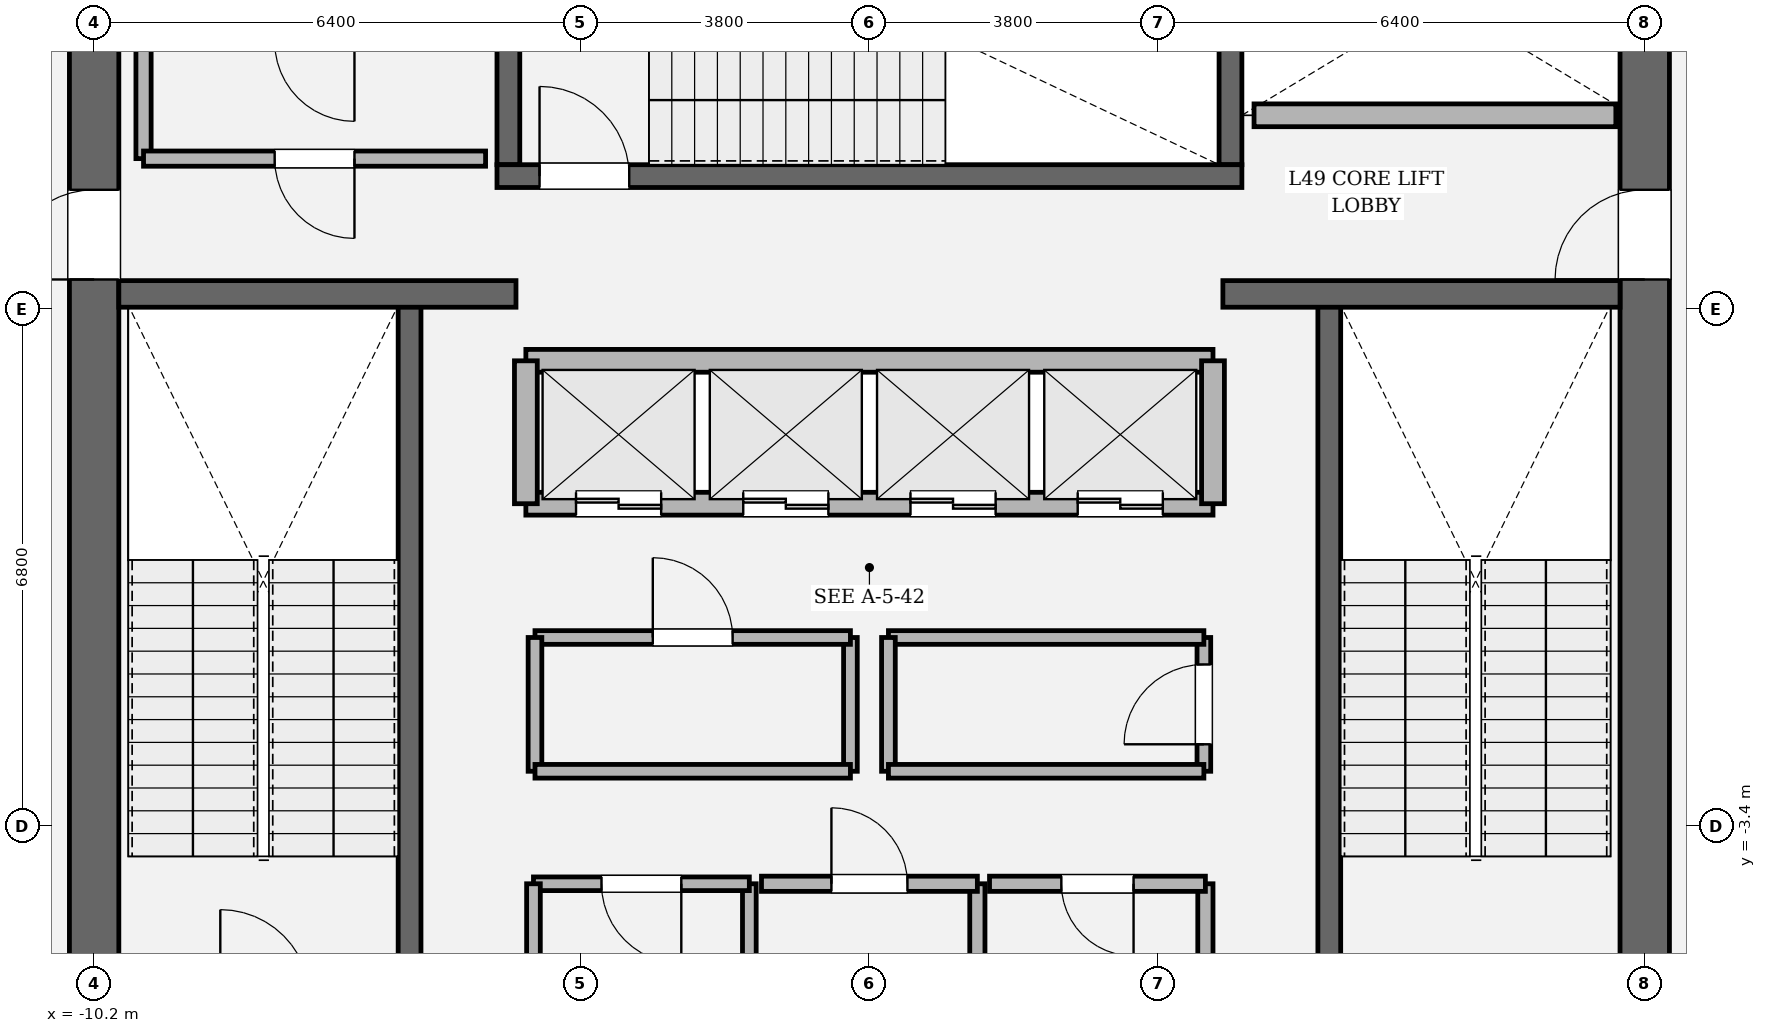
"""IFC4 building model, lengths in metres.
Left out: names, types, materials, properties, quantities, classifications, styles, units other than length and angle.
Written with IfcOpenShell. Run it as: python <this file> out.ifc"""

import sys

from ifc_helpers import new_model, si_unit, direction, frame, frame_2d, origin, place, context, subcontext, project, spatial, rectangle, extrude, element, fill, save


model = new_model("IFC4")
c1 = context("Model", 3, precision=1e-05, world=origin(), true_north=direction((0.0, 1.0)))
c2 = subcontext(c1, "Body", "Model", "MODEL_VIEW")
j1 = project(units=[si_unit("LENGTHUNIT", "METRE"), si_unit("PLANEANGLEUNIT", "RADIAN")], contexts=[c1])
p1 = place(None, origin())
s1 = spatial("IfcSite", under=j1, at=p1, CompositionType="ELEMENT")
p2 = place(p1, origin())
s2 = spatial("IfcBuilding", under=s1, at=p2, CompositionType="ELEMENT")
p3 = place(p2, frame((0.0, 0.0, 208.65)))
s3 = spatial("IfcBuildingStorey", under=s2, at=p3, CompositionType="ELEMENT", Elevation=208.65)
p4 = place(p3, frame((-10.2, -8.875, 0.0), z_axis=(0.0, 0.0, 1.0), x_axis=(0.0, 1.0, 0.0)))
e1 = element("IfcWall", 1, at=p4, inside=s3, PredefinedType="SHEAR", context=c2, shape_type="SweptSolid", body=[
    extrude(rectangle(XDim=17.75, YDim=0.65, at=frame_2d((8.875, 0.0))), origin(), (0.0, 0.0, 1.0), 4.05),
])
p5 = place(p4, frame((12.665, 0.0, 0.0)))
e2 = element("IfcOpeningElement", 2, at=p5, cuts=e1, PredefinedType="OPENING", context=c2, shape_type="SweptSolid", body=[
    extrude(rectangle(XDim=1.18, YDim=2.2, at=frame_2d((0.59, 1.1))), frame((0.0, 0.335, 0.0), z_axis=(0.0, -1.0, 0.0), x_axis=(1.0, 0.0, 0.0)), (0.0, 0.0, 1.0), 0.67),
])
p6 = place(p3, frame((10.2, 8.875, 0.0), z_axis=(0.0, 0.0, 1.0), x_axis=(0.0, -1.0, 0.0)))
e3 = element("IfcWall", 3, at=p6, inside=s3, PredefinedType="SHEAR", context=c2, shape_type="SweptSolid", body=[
    extrude(rectangle(XDim=17.75, YDim=0.65, at=frame_2d((8.875, 0.0))), origin(), (0.0, 0.0, 1.0), 4.05),
])
p7 = place(p6, frame((3.905, 0.0, 0.0)))
e4 = element("IfcOpeningElement", 4, at=p7, cuts=e3, PredefinedType="OPENING", context=c2, shape_type="SweptSolid", body=[
    extrude(rectangle(XDim=1.18, YDim=2.2, at=frame_2d((0.59, 1.1))), frame((0.0, 0.335, 0.0), z_axis=(0.0, -1.0, 0.0), x_axis=(1.0, 0.0, 0.0)), (0.0, 0.0, 1.0), 0.67),
])
for number, where, z_axis, x_axis in (
    (5, (-6.05, -5.5, 0.0), (0.0, 0.0, 1.0), (0.0, 1.0, 0.0)),
    (6, (6.05, 3.45, 0.0), (0.0, 0.0, 1.0), (0.0, -1.0, 0.0)),
):
    element("IfcWall", number, at=place(p3, frame(where, z_axis=z_axis, x_axis=x_axis)), inside=s3, PredefinedType="SOLIDWALL", context=c2, shape_type="SweptSolid", body=[
        extrude(rectangle(XDim=8.95, YDim=0.3, at=frame_2d((4.475, 0.0))), origin(), (0.0, 0.0, 1.0), 4.05),
    ])
for number, where, z_axis, x_axis in (
    (7, (-4.75, 5.3, 0.0), (0.0, 0.0, 1.0), (0.0, 1.0, 0.0)),
    (8, (4.75, 8.875, 0.0), (0.0, 0.0, 1.0), (0.0, -1.0, 0.0)),
):
    element("IfcWall", number, at=place(p3, frame(where, z_axis=z_axis, x_axis=x_axis)), inside=s3, PredefinedType="SOLIDWALL", context=c2, shape_type="SweptSolid", body=[
        extrude(rectangle(XDim=3.575, YDim=0.3, at=frame_2d((1.788, 0.0))), origin(), (0.0, 0.0, 1.0), 4.05),
    ])
p8 = place(p3, frame((-4.9, 5.15, 0.0), z_axis=(0.0, 0.0, 1.0), x_axis=(1.0, 0.0, 0.0)))
e9 = element("IfcWall", 9, at=p8, inside=s3, PredefinedType="SOLIDWALL", context=c2, shape_type="SweptSolid", body=[
    extrude(rectangle(XDim=9.8, YDim=0.3, at=frame_2d((4.9, 0.0))), origin(), (0.0, 0.0, 1.0), 4.05),
])
p9 = place(p8, frame((0.56, 0.0, 0.0)))
e10 = element("IfcOpeningElement", 10, at=p9, cuts=e9, PredefinedType="OPENING", context=c2, shape_type="SweptSolid", body=[
    extrude(rectangle(XDim=1.18, YDim=2.2, at=frame_2d((0.59, 1.1))), frame((0.0, 0.16, 0.0), z_axis=(0.0, -1.0, 0.0), x_axis=(1.0, 0.0, 0.0)), (0.0, 0.0, 1.0), 0.32),
])
for number, where, z_axis, x_axis in (
    (11, (-9.875, 3.6, 0.0), (0.0, 0.0, 1.0), (1.0, 0.0, 0.0)),
    (12, (4.65, 3.6, 0.0), (0.0, 0.0, 1.0), (1.0, 0.0, 0.0)),
):
    element("IfcWall", number, at=place(p3, frame(where, z_axis=z_axis, x_axis=x_axis)), inside=s3, PredefinedType="SOLIDWALL", context=c2, shape_type="SweptSolid", body=[
        extrude(rectangle(XDim=5.225, YDim=0.35, at=frame_2d((2.613, 0.0))), origin(), (0.0, 0.0, 1.0), 4.05),
    ])
p10 = place(p3, frame((-4.52, 0.84, 0.0), z_axis=(0.0, 0.0, 1.0), x_axis=(1.0, 0.0, 0.0)))
e13 = element("IfcWall", 13, at=p10, inside=s3, PredefinedType="SOLIDWALL", context=c2, shape_type="SweptSolid", body=[
    extrude(rectangle(XDim=9.04, YDim=0.3, at=frame_2d((4.52, 0.0))), origin(), (0.0, 0.0, 1.0), 3.83),
])
p11 = place(p10, frame((0.66, 0.0, 0.0)))
e14 = element("IfcOpeningElement", 14, at=p11, cuts=e13, PredefinedType="OPENING", context=c2, shape_type="SweptSolid", body=[
    extrude(rectangle(XDim=1.12, YDim=2.25, at=frame_2d((0.56, 1.125))), frame((0.0, 0.16, 0.0), z_axis=(0.0, -1.0, 0.0), x_axis=(1.0, 0.0, 0.0)), (0.0, 0.0, 1.0), 0.32),
])
p12 = place(p10, frame((2.86, 0.0, 0.0)))
e15 = element("IfcOpeningElement", 15, at=p12, cuts=e13, PredefinedType="OPENING", context=c2, shape_type="SweptSolid", body=[
    extrude(rectangle(XDim=1.12, YDim=2.25, at=frame_2d((0.56, 1.125))), frame((0.0, 0.16, 0.0), z_axis=(0.0, -1.0, 0.0), x_axis=(1.0, 0.0, 0.0)), (0.0, 0.0, 1.0), 0.32),
])
p13 = place(p10, frame((5.06, 0.0, 0.0)))
e16 = element("IfcOpeningElement", 16, at=p13, cuts=e13, PredefinedType="OPENING", context=c2, shape_type="SweptSolid", body=[
    extrude(rectangle(XDim=1.12, YDim=2.25, at=frame_2d((0.56, 1.125))), frame((0.0, 0.16, 0.0), z_axis=(0.0, -1.0, 0.0), x_axis=(1.0, 0.0, 0.0)), (0.0, 0.0, 1.0), 0.32),
])
p14 = place(p10, frame((7.26, 0.0, 0.0)))
e17 = element("IfcOpeningElement", 17, at=p14, cuts=e13, PredefinedType="OPENING", context=c2, shape_type="SweptSolid", body=[
    extrude(rectangle(XDim=1.12, YDim=2.25, at=frame_2d((0.56, 1.125))), frame((0.0, 0.16, 0.0), z_axis=(0.0, -1.0, 0.0), x_axis=(1.0, 0.0, 0.0)), (0.0, 0.0, 1.0), 0.32),
])
p15 = place(p3, frame((-4.52, 2.72, 0.0), z_axis=(0.0, 0.0, 1.0), x_axis=(1.0, 0.0, 0.0)))
e18 = element("IfcWall", 18, at=p15, inside=s3, PredefinedType="SOLIDWALL", context=c2, shape_type="SweptSolid", body=[
    extrude(rectangle(XDim=9.04, YDim=0.3, at=frame_2d((4.52, 0.0))), origin(), (0.0, 0.0, 1.0), 3.83),
])
for number, where, z_axis, x_axis in (
    (19, (-4.52, 0.84, 0.0), (0.0, 0.0, 1.0), (0.0, 1.0, 0.0)),
    (20, (4.52, 0.84, 0.0), (0.0, 0.0, 1.0), (0.0, 1.0, 0.0)),
):
    element("IfcWall", number, at=place(p3, frame(where, z_axis=z_axis, x_axis=x_axis)), inside=s3, PredefinedType="SOLIDWALL", context=c2, shape_type="SweptSolid", body=[
        extrude(rectangle(XDim=1.88, YDim=0.3, at=frame_2d((0.94, 0.0))), origin(), (0.0, 0.0, 1.0), 3.83),
    ])
p16 = place(p3, frame((5.06, 5.95, 0.0), z_axis=(0.0, 0.0, 1.0), x_axis=(1.0, 0.0, 0.0)))
e21 = element("IfcWall", 21, at=p16, inside=s3, PredefinedType="SOLIDWALL", context=c2, shape_type="SweptSolid", body=[
    extrude(rectangle(XDim=4.76, YDim=0.3, at=frame_2d((2.38, 0.0))), origin(), (0.0, 0.0, 1.0), 3.83),
])
p17 = place(p3, frame((-1.58, -5.9, 0.0), z_axis=(0.0, 0.0, 1.0), x_axis=(0.0, 1.0, 0.0)))
e22 = element("IfcWall", 22, at=p17, inside=s3, PredefinedType="PARTITIONING", context=c2, shape_type="SweptSolid", body=[
    extrude(rectangle(XDim=1.74, YDim=0.18, at=frame_2d((0.87, 0.0))), origin(), (0.0, 0.0, 1.0), 3.83),
])
p18 = place(p3, frame((-1.58, -4.16, 0.0), z_axis=(0.0, 0.0, 1.0), x_axis=(-1.0, 0.0, 0.0)))
e23 = element("IfcWall", 23, at=p18, inside=s3, PredefinedType="PARTITIONING", context=c2, shape_type="SweptSolid", body=[
    extrude(rectangle(XDim=2.84, YDim=0.18, at=frame_2d((1.42, 0.0))), origin(), (0.0, 0.0, 1.0), 3.83),
])
p19 = place(p18, frame((0.895, 0.0, 0.0)))
e24 = element("IfcOpeningElement", 24, at=p19, cuts=e23, PredefinedType="OPENING", context=c2, shape_type="SweptSolid", body=[
    extrude(rectangle(XDim=1.05, YDim=2.2, at=frame_2d((0.525, 1.1))), frame((0.0, 0.1, 0.0), z_axis=(0.0, -1.0, 0.0), x_axis=(1.0, 0.0, 0.0)), (0.0, 0.0, 1.0), 0.2),
])
p20 = place(p3, frame((-4.42, -4.16, 0.0), z_axis=(0.0, 0.0, 1.0), x_axis=(0.0, -1.0, 0.0)))
e25 = element("IfcWall", 25, at=p20, inside=s3, PredefinedType="PARTITIONING", context=c2, shape_type="SweptSolid", body=[
    extrude(rectangle(XDim=1.74, YDim=0.18, at=frame_2d((0.87, 0.0))), origin(), (0.0, 0.0, 1.0), 3.83),
])
p21 = place(p3, frame((1.42, -5.9, 0.0), z_axis=(0.0, 0.0, 1.0), x_axis=(0.0, 1.0, 0.0)))
e26 = element("IfcWall", 26, at=p21, inside=s3, PredefinedType="SOLIDWALL", context=c2, shape_type="SweptSolid", body=[
    extrude(rectangle(XDim=1.74, YDim=0.2, at=frame_2d((0.87, 0.0))), origin(), (0.0, 0.0, 1.0), 3.83),
])
p22 = place(p3, frame((1.42, -4.16, 0.0), z_axis=(0.0, 0.0, 1.0), x_axis=(-1.0, 0.0, 0.0)))
e27 = element("IfcWall", 27, at=p22, inside=s3, PredefinedType="SOLIDWALL", context=c2, shape_type="SweptSolid", body=[
    extrude(rectangle(XDim=2.84, YDim=0.2, at=frame_2d((1.42, 0.0))), origin(), (0.0, 0.0, 1.0), 3.83),
])
p23 = place(p22, frame((0.92, 0.0, 0.0)))
e28 = element("IfcOpeningElement", 28, at=p23, cuts=e27, PredefinedType="OPENING", context=c2, shape_type="SweptSolid", body=[
    extrude(rectangle(XDim=1.0, YDim=2.15, at=frame_2d((0.5, 1.075))), frame((0.0, 0.11, 0.0), z_axis=(0.0, -1.0, 0.0), x_axis=(1.0, 0.0, 0.0)), (0.0, 0.0, 1.0), 0.22),
])
p24 = place(p3, frame((4.42, -5.9, 0.0), z_axis=(0.0, 0.0, 1.0), x_axis=(0.0, 1.0, 0.0)))
e29 = element("IfcWall", 29, at=p24, inside=s3, PredefinedType="SOLIDWALL", context=c2, shape_type="SweptSolid", body=[
    extrude(rectangle(XDim=1.74, YDim=0.2, at=frame_2d((0.87, 0.0))), origin(), (0.0, 0.0, 1.0), 3.83),
])
p25 = place(p3, frame((4.42, -4.16, 0.0), z_axis=(0.0, 0.0, 1.0), x_axis=(-1.0, 0.0, 0.0)))
e30 = element("IfcWall", 30, at=p25, inside=s3, PredefinedType="SOLIDWALL", context=c2, shape_type="SweptSolid", body=[
    extrude(rectangle(XDim=2.84, YDim=0.2, at=frame_2d((1.42, 0.0))), origin(), (0.0, 0.0, 1.0), 3.83),
])
p26 = place(p25, frame((0.945, 0.0, 0.0)))
e31 = element("IfcOpeningElement", 31, at=p26, cuts=e30, PredefinedType="OPENING", context=c2, shape_type="SweptSolid", body=[
    extrude(rectangle(XDim=0.95, YDim=2.15, at=frame_2d((0.475, 1.075))), frame((0.0, 0.11, 0.0), z_axis=(0.0, -1.0, 0.0), x_axis=(1.0, 0.0, 0.0)), (0.0, 0.0, 1.0), 0.22),
])
p27 = place(p3, frame((-0.25, -2.68, 0.0), z_axis=(0.0, 0.0, 1.0), x_axis=(0.0, 1.0, 0.0)))
e32 = element("IfcWall", 32, at=p27, inside=s3, PredefinedType="PARTITIONING", context=c2, shape_type="SweptSolid", body=[
    extrude(rectangle(XDim=1.76, YDim=0.18, at=frame_2d((0.88, 0.0))), origin(), (0.0, 0.0, 1.0), 3.83),
])
p28 = place(p3, frame((-0.25, -0.92, 0.0), z_axis=(0.0, 0.0, 1.0), x_axis=(-1.0, 0.0, 0.0)))
e33 = element("IfcWall", 33, at=p28, inside=s3, PredefinedType="PARTITIONING", context=c2, shape_type="SweptSolid", body=[
    extrude(rectangle(XDim=4.15, YDim=0.18, at=frame_2d((2.075, 0.0))), origin(), (0.0, 0.0, 1.0), 3.83),
])
p29 = place(p28, frame((1.55, 0.0, 0.0)))
e34 = element("IfcOpeningElement", 34, at=p29, cuts=e33, PredefinedType="OPENING", context=c2, shape_type="SweptSolid", body=[
    extrude(rectangle(XDim=1.05, YDim=2.2, at=frame_2d((0.525, 1.1))), frame((0.0, 0.1, 0.0), z_axis=(0.0, -1.0, 0.0), x_axis=(1.0, 0.0, 0.0)), (0.0, 0.0, 1.0), 0.2),
])
p30 = place(p3, frame((-4.4, -0.92, 0.0), z_axis=(0.0, 0.0, 1.0), x_axis=(0.0, -1.0, 0.0)))
e35 = element("IfcWall", 35, at=p30, inside=s3, PredefinedType="PARTITIONING", context=c2, shape_type="SweptSolid", body=[
    extrude(rectangle(XDim=1.76, YDim=0.18, at=frame_2d((0.88, 0.0))), origin(), (0.0, 0.0, 1.0), 3.83),
])
p31 = place(p3, frame((-4.4, -2.68, 0.0), z_axis=(0.0, 0.0, 1.0), x_axis=(1.0, 0.0, 0.0)))
e36 = element("IfcWall", 36, at=p31, inside=s3, PredefinedType="PARTITIONING", context=c2, shape_type="SweptSolid", body=[
    extrude(rectangle(XDim=4.15, YDim=0.18, at=frame_2d((2.075, 0.0))), origin(), (0.0, 0.0, 1.0), 3.83),
])
p32 = place(p3, frame((4.4, -2.68, 0.0), z_axis=(0.0, 0.0, 1.0), x_axis=(0.0, 1.0, 0.0)))
e37 = element("IfcWall", 37, at=p32, inside=s3, PredefinedType="PARTITIONING", context=c2, shape_type="SweptSolid", body=[
    extrude(rectangle(XDim=1.76, YDim=0.18, at=frame_2d((0.88, 0.0))), origin(), (0.0, 0.0, 1.0), 3.83),
])
p33 = place(p32, frame((0.355, 0.0, 0.0)))
e38 = element("IfcOpeningElement", 38, at=p33, cuts=e37, PredefinedType="OPENING", context=c2, shape_type="SweptSolid", body=[
    extrude(rectangle(XDim=1.05, YDim=2.2, at=frame_2d((0.525, 1.1))), frame((0.0, 0.1, 0.0), z_axis=(0.0, -1.0, 0.0), x_axis=(1.0, 0.0, 0.0)), (0.0, 0.0, 1.0), 0.2),
])
p34 = place(p3, frame((4.4, -0.92, 0.0), z_axis=(0.0, 0.0, 1.0), x_axis=(-1.0, 0.0, 0.0)))
e39 = element("IfcWall", 39, at=p34, inside=s3, PredefinedType="PARTITIONING", context=c2, shape_type="SweptSolid", body=[
    extrude(rectangle(XDim=4.15, YDim=0.18, at=frame_2d((2.075, 0.0))), origin(), (0.0, 0.0, 1.0), 3.83),
])
p35 = place(p3, frame((0.25, -0.92, 0.0), z_axis=(0.0, 0.0, 1.0), x_axis=(0.0, -1.0, 0.0)))
e40 = element("IfcWall", 40, at=p35, inside=s3, PredefinedType="PARTITIONING", context=c2, shape_type="SweptSolid", body=[
    extrude(rectangle(XDim=1.76, YDim=0.18, at=frame_2d((0.88, 0.0))), origin(), (0.0, 0.0, 1.0), 3.83),
])
p36 = place(p3, frame((0.25, -2.68, 0.0), z_axis=(0.0, 0.0, 1.0), x_axis=(1.0, 0.0, 0.0)))
e41 = element("IfcWall", 41, at=p36, inside=s3, PredefinedType="PARTITIONING", context=c2, shape_type="SweptSolid", body=[
    extrude(rectangle(XDim=4.15, YDim=0.18, at=frame_2d((2.075, 0.0))), origin(), (0.0, 0.0, 1.0), 3.83),
])
p37 = place(p3, frame((-9.55, 6.92, 0.0), z_axis=(0.0, 0.0, 1.0), x_axis=(0.0, -1.0, 0.0)))
e42 = element("IfcWall", 42, at=p37, inside=s3, PredefinedType="SOLIDWALL", context=c2, shape_type="SweptSolid", body=[
    extrude(rectangle(XDim=1.54, YDim=0.2, at=frame_2d((0.77, 0.0))), origin(), (0.0, 0.0, 1.0), 3.83),
])
p38 = place(p3, frame((-9.55, 5.38, 0.0), z_axis=(0.0, 0.0, 1.0), x_axis=(1.0, 0.0, 0.0)))
e43 = element("IfcWall", 43, at=p38, inside=s3, PredefinedType="SOLIDWALL", context=c2, shape_type="SweptSolid", body=[
    extrude(rectangle(XDim=4.5, YDim=0.2, at=frame_2d((2.25, 0.0))), origin(), (0.0, 0.0, 1.0), 3.83),
])
p39 = place(p38, frame((1.725, 0.0, 0.0)))
e44 = element("IfcOpeningElement", 44, at=p39, cuts=e43, PredefinedType="OPENING", context=c2, shape_type="SweptSolid", body=[
    extrude(rectangle(XDim=1.05, YDim=2.2, at=frame_2d((0.525, 1.1))), frame((0.0, 0.11, 0.0), z_axis=(0.0, -1.0, 0.0), x_axis=(1.0, 0.0, 0.0)), (0.0, 0.0, 1.0), 0.22),
])
p40 = place(p9, origin())
e45 = element("IfcDoor", 45, at=p40, inside=s3, OperationType="SINGLE_SWING_LEFT", PredefinedType="DOOR", context=c2, shape_type="SweptSolid", body=[
    extrude(rectangle(XDim=1.18, YDim=2.2, at=frame_2d((0.59, 1.1))), frame((0.0, 0.025, 0.0), z_axis=(0.0, -1.0, 0.0), x_axis=(1.0, 0.0, 0.0)), (0.0, 0.0, 1.0), 0.05),
])
fill(e10, e45)
p41 = place(p5, origin())
e46 = element("IfcDoor", 46, at=p41, inside=s3, OperationType="SINGLE_SWING_LEFT", PredefinedType="DOOR", context=c2, shape_type="SweptSolid", body=[
    extrude(rectangle(XDim=1.18, YDim=2.2, at=frame_2d((0.59, 1.1))), frame((0.0, 0.025, 0.0), z_axis=(0.0, -1.0, 0.0), x_axis=(1.0, 0.0, 0.0)), (0.0, 0.0, 1.0), 0.05),
])
fill(e2, e46)
p42 = place(p7, origin())
e47 = element("IfcDoor", 47, at=p42, inside=s3, OperationType="SINGLE_SWING_RIGHT", PredefinedType="DOOR", context=c2, shape_type="SweptSolid", body=[
    extrude(rectangle(XDim=1.18, YDim=2.2, at=frame_2d((0.59, 1.1))), frame((0.0, 0.025, 0.0), z_axis=(0.0, -1.0, 0.0), x_axis=(1.0, 0.0, 0.0)), (0.0, 0.0, 1.0), 0.05),
])
fill(e4, e47)
p43 = place(p11, origin())
e48 = element("IfcDoor", 48, at=p43, inside=s3, OperationType="DOUBLE_DOOR_SLIDING", PredefinedType="DOOR", context=c2, shape_type="SweptSolid", body=[
    extrude(rectangle(XDim=1.12, YDim=2.25, at=frame_2d((0.56, 1.125))), frame((0.0, 0.025, 0.0), z_axis=(0.0, -1.0, 0.0), x_axis=(1.0, 0.0, 0.0)), (0.0, 0.0, 1.0), 0.05),
])
fill(e14, e48)
p44 = place(p12, origin())
e49 = element("IfcDoor", 49, at=p44, inside=s3, OperationType="DOUBLE_DOOR_SLIDING", PredefinedType="DOOR", context=c2, shape_type="SweptSolid", body=[
    extrude(rectangle(XDim=1.12, YDim=2.25, at=frame_2d((0.56, 1.125))), frame((0.0, 0.025, 0.0), z_axis=(0.0, -1.0, 0.0), x_axis=(1.0, 0.0, 0.0)), (0.0, 0.0, 1.0), 0.05),
])
fill(e15, e49)
p45 = place(p13, origin())
e50 = element("IfcDoor", 50, at=p45, inside=s3, OperationType="DOUBLE_DOOR_SLIDING", PredefinedType="DOOR", context=c2, shape_type="SweptSolid", body=[
    extrude(rectangle(XDim=1.12, YDim=2.25, at=frame_2d((0.56, 1.125))), frame((0.0, 0.025, 0.0), z_axis=(0.0, -1.0, 0.0), x_axis=(1.0, 0.0, 0.0)), (0.0, 0.0, 1.0), 0.05),
])
fill(e16, e50)
p46 = place(p14, origin())
e51 = element("IfcDoor", 51, at=p46, inside=s3, OperationType="DOUBLE_DOOR_SLIDING", PredefinedType="DOOR", context=c2, shape_type="SweptSolid", body=[
    extrude(rectangle(XDim=1.12, YDim=2.25, at=frame_2d((0.56, 1.125))), frame((0.0, 0.025, 0.0), z_axis=(0.0, -1.0, 0.0), x_axis=(1.0, 0.0, 0.0)), (0.0, 0.0, 1.0), 0.05),
])
fill(e17, e51)
p47 = place(p19, origin())
e52 = element("IfcDoor", 52, at=p47, inside=s3, OperationType="SINGLE_SWING_LEFT", PredefinedType="DOOR", context=c2, shape_type="SweptSolid", body=[
    extrude(rectangle(XDim=1.05, YDim=2.2, at=frame_2d((0.525, 1.1))), frame((0.0, 0.025, 0.0), z_axis=(0.0, -1.0, 0.0), x_axis=(1.0, 0.0, 0.0)), (0.0, 0.0, 1.0), 0.05),
])
fill(e24, e52)
p48 = place(p23, origin())
e53 = element("IfcDoor", 53, at=p48, inside=s3, OperationType="SINGLE_SWING_RIGHT", PredefinedType="DOOR", context=c2, shape_type="SweptSolid", body=[
    extrude(rectangle(XDim=1.0, YDim=2.15, at=frame_2d((0.5, 1.075))), frame((0.0, 0.025, 0.0), z_axis=(0.0, -1.0, 0.0), x_axis=(1.0, 0.0, 0.0)), (0.0, 0.0, 1.0), 0.05),
])
fill(e28, e53)
p49 = place(p26, origin())
e54 = element("IfcDoor", 54, at=p49, inside=s3, OperationType="SINGLE_SWING_LEFT", PredefinedType="DOOR", context=c2, shape_type="SweptSolid", body=[
    extrude(rectangle(XDim=0.95, YDim=2.15, at=frame_2d((0.475, 1.075))), frame((0.0, 0.025, 0.0), z_axis=(0.0, -1.0, 0.0), x_axis=(1.0, 0.0, 0.0)), (0.0, 0.0, 1.0), 0.05),
])
fill(e31, e54)
p50 = place(p29, origin())
e55 = element("IfcDoor", 55, at=p50, inside=s3, OperationType="SINGLE_SWING_RIGHT", PredefinedType="DOOR", context=c2, shape_type="SweptSolid", body=[
    extrude(rectangle(XDim=1.05, YDim=2.2, at=frame_2d((0.525, 1.1))), frame((0.0, 0.025, 0.0), z_axis=(0.0, -1.0, 0.0), x_axis=(1.0, 0.0, 0.0)), (0.0, 0.0, 1.0), 0.05),
])
fill(e34, e55)
p51 = place(p33, origin())
e56 = element("IfcDoor", 56, at=p51, inside=s3, OperationType="SINGLE_SWING_LEFT", PredefinedType="DOOR", context=c2, shape_type="SweptSolid", body=[
    extrude(rectangle(XDim=1.05, YDim=2.2, at=frame_2d((0.525, 1.1))), frame((0.0, 0.025, 0.0), z_axis=(0.0, -1.0, 0.0), x_axis=(1.0, 0.0, 0.0)), (0.0, 0.0, 1.0), 0.05),
])
fill(e38, e56)
p52 = place(p39, origin())
e57 = element("IfcDoor", 57, at=p52, inside=s3, OperationType="SINGLE_SWING_RIGHT", PredefinedType="DOOR", context=c2, shape_type="SweptSolid", body=[
    extrude(rectangle(XDim=1.05, YDim=2.2, at=frame_2d((0.525, 1.1))), frame((0.0, 0.025, 0.0), z_axis=(0.0, -1.0, 0.0), x_axis=(1.0, 0.0, 0.0)), (0.0, 0.0, 1.0), 0.05),
])
fill(e44, e57)
save(model, sys.argv[1])
